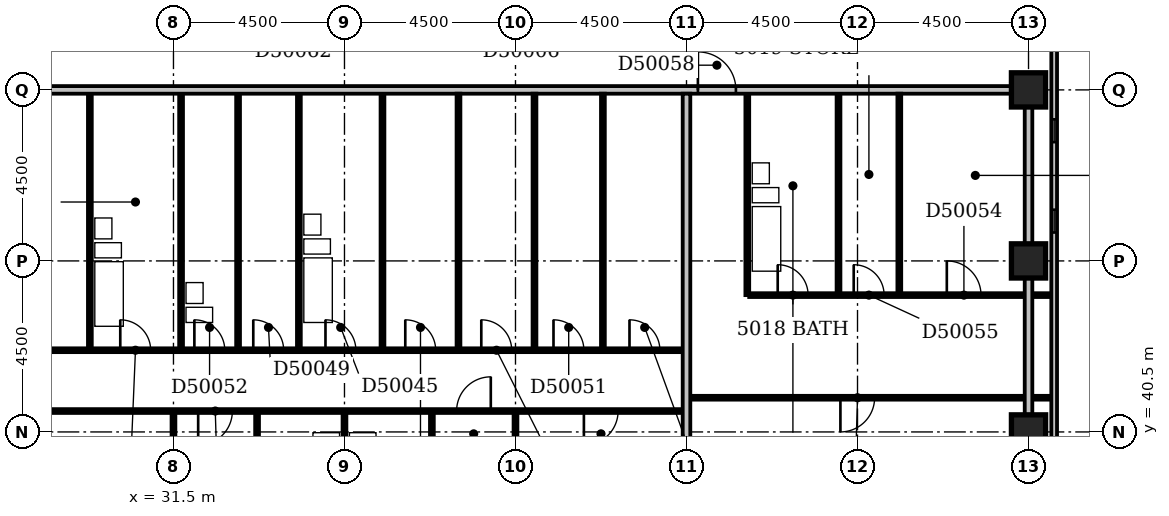
"""IFC4 building model, lengths in metres.
Left out: names, types, materials, properties, quantities, classifications, styles, units other than length and angle.
Written with IfcOpenShell. Run it as: python <this file> out.ifc"""

import sys

from ifc_helpers import new_model, si_unit, direction, frame, frame_2d, origin, origin_2d, place, context, subcontext, project, spatial, rectangle, extrude, element, fill, save


model = new_model("IFC4")
c1 = context("Model", 3, precision=1e-05, world=origin(), true_north=direction((0.0, 1.0)))
c2 = subcontext(c1, "Body", "Model", "MODEL_VIEW")
j1 = project(units=[si_unit("LENGTHUNIT", "METRE"), si_unit("PLANEANGLEUNIT", "RADIAN")], contexts=[c1])
p1 = place(None, origin())
s1 = spatial("IfcSite", under=j1, at=p1, CompositionType="ELEMENT")
p2 = place(p1, origin())
s2 = spatial("IfcBuilding", under=s1, at=p2, CompositionType="ELEMENT")
p3 = place(p2, frame((0.0, 0.0, 197.0)))
s3 = spatial("IfcBuildingStorey", under=s2, at=p3, CompositionType="ELEMENT", Elevation=197.0)
for number, where, z_axis, x_axis in (
    (1, (54.0, 40.5, -0.3), (0.0, 0.0, 1.0), (1.0, 0.0, 0.0)),
    (2, (54.0, 45.0, -0.3), (0.0, 0.0, 1.0), (1.0, 0.0, 0.0)),
    (3, (54.0, 49.5, -0.3), (0.0, 0.0, 1.0), (1.0, 0.0, 0.0)),
):
    element("IfcColumn", number, at=place(p3, frame(where, z_axis=z_axis, x_axis=x_axis)), inside=s3, PredefinedType="COLUMN", context=c2, shape_type="SweptSolid", body=[
        extrude(rectangle(XDim=0.9, YDim=0.9, at=origin_2d()), origin(), (0.0, 0.0, 1.0), 3.6),
    ])
p4 = place(p3, frame((54.675, 39.9, 0.0), z_axis=(0.0, 0.0, 1.0), x_axis=(0.0, 1.0, 0.0)))
e4 = element("IfcWall", 4, at=p4, inside=s3, PredefinedType="STANDARD", context=c2, shape_type="SweptSolid", body=[
    extrude(rectangle(XDim=14.85, YDim=0.15, at=frame_2d((7.425, 0.0))), origin(), (0.0, 0.0, 1.0), 2.7),
])
p5 = place(p4, frame((5.848, 0.0, 0.6)))
e5 = element("IfcOpeningElement", 5, at=p5, cuts=e4, PredefinedType="OPENING", context=c2, shape_type="SweptSolid", body=[
    extrude(rectangle(XDim=0.6, YDim=1.8, at=frame_2d((0.3, 0.9))), frame((0.0, 0.087, 0.0), z_axis=(0.0, -1.0, 0.0), x_axis=(1.0, 0.0, 0.0)), (0.0, 0.0, 1.0), 0.174),
])
p6 = place(p4, frame((8.226, 0.0, 0.6)))
e6 = element("IfcOpeningElement", 6, at=p6, cuts=e4, PredefinedType="OPENING", context=c2, shape_type="SweptSolid", body=[
    extrude(rectangle(XDim=0.6, YDim=1.8, at=frame_2d((0.3, 0.9))), frame((0.0, 0.087, 0.0), z_axis=(0.0, -1.0, 0.0), x_axis=(1.0, 0.0, 0.0)), (0.0, 0.0, 1.0), 0.174),
])
p7 = place(p3, frame((31.5, 36.45, 0.0), z_axis=(0.0, 0.0, 1.0), x_axis=(0.0, 1.0, 0.0)))
e7 = element("IfcWall", 7, at=p7, inside=s3, PredefinedType="PARTITIONING", context=c2, shape_type="SweptSolid", body=[
    extrude(rectangle(XDim=4.55, YDim=0.1, at=frame_2d((2.275, 0.0))), origin(), (0.0, 0.0, 1.0), 3.3),
])
p8 = place(p3, frame((36.0, 36.45, 0.0), z_axis=(0.0, 0.0, 1.0), x_axis=(0.0, 1.0, 0.0)))
e8 = element("IfcWall", 8, at=p8, inside=s3, PredefinedType="PARTITIONING", context=c2, shape_type="SweptSolid", body=[
    extrude(rectangle(XDim=4.55, YDim=0.1, at=frame_2d((2.275, 0.0))), origin(), (0.0, 0.0, 1.0), 2.4),
])
p9 = place(p3, frame((40.5, 36.45, 0.0), z_axis=(0.0, 0.0, 1.0), x_axis=(0.0, 1.0, 0.0)))
e9 = element("IfcWall", 9, at=p9, inside=s3, PredefinedType="PARTITIONING", context=c2, shape_type="SweptSolid", body=[
    extrude(rectangle(XDim=4.55, YDim=0.1, at=frame_2d((2.275, 0.0))), origin(), (0.0, 0.0, 1.0), 3.3),
])
p10 = place(p3, frame((45.0, 36.45, 0.0), z_axis=(0.0, 0.0, 1.0), x_axis=(0.0, 1.0, 0.0)))
e10 = element("IfcWall", 10, at=p10, inside=s3, PredefinedType="PARTITIONING", context=c2, shape_type="SweptSolid", body=[
    extrude(rectangle(XDim=12.95, YDim=0.2, at=frame_2d((6.475, 0.0))), origin(), (0.0, 0.0, 1.0), 2.6),
])
p11 = place(p3, frame((33.7, 38.15, 0.0), z_axis=(0.0, 0.0, 1.0), x_axis=(0.0, 1.0, 0.0)))
e11 = element("IfcWall", 11, at=p11, inside=s3, PredefinedType="PLUMBINGWALL", context=c2, shape_type="SweptSolid", body=[
    extrude(rectangle(XDim=2.85, YDim=0.1, at=frame_2d((1.425, 0.0))), origin(), (0.0, 0.0, 1.0), 3.3),
])
p12 = place(p11, frame((1.05, 0.0, 0.0)))
e12 = element("IfcOpeningElement", 12, at=p12, cuts=e11, PredefinedType="OPENING", context=c2, shape_type="SweptSolid", body=[
    extrude(rectangle(XDim=0.8, YDim=2.1, at=frame_2d((0.4, 1.05))), frame((0.0, 0.062, 0.0), z_axis=(0.0, -1.0, 0.0), x_axis=(1.0, 0.0, 0.0)), (0.0, 0.0, 1.0), 0.124),
])
p13 = place(p3, frame((38.3, 38.15, 0.0), z_axis=(0.0, 0.0, 1.0), x_axis=(0.0, 1.0, 0.0)))
e13 = element("IfcWall", 13, at=p13, inside=s3, PredefinedType="PLUMBINGWALL", context=c2, shape_type="SweptSolid", body=[
    extrude(rectangle(XDim=2.85, YDim=0.1, at=frame_2d((1.425, 0.0))), origin(), (0.0, 0.0, 1.0), 3.3),
])
p14 = place(p13, frame((1.05, 0.0, 0.0)))
e14 = element("IfcOpeningElement", 14, at=p14, cuts=e13, PredefinedType="OPENING", context=c2, shape_type="SweptSolid", body=[
    extrude(rectangle(XDim=0.8, YDim=2.1, at=frame_2d((0.4, 1.05))), frame((0.0, 0.062, 0.0), z_axis=(0.0, -1.0, 0.0), x_axis=(1.0, 0.0, 0.0)), (0.0, 0.0, 1.0), 0.124),
])
p15 = place(p3, frame((54.0, 40.95, 0.0), z_axis=(0.0, 0.0, 1.0), x_axis=(0.0, 1.0, 0.0)))
e15 = element("IfcWall", 15, at=p15, inside=s3, PredefinedType="PARTITIONING", context=c2, shape_type="SweptSolid", body=[
    extrude(rectangle(XDim=8.1, YDim=0.2, at=frame_2d((4.05, 0.0))), origin(), (0.0, 0.0, 1.0), 2.7),
])
p16 = place(p3, frame((22.6, 41.05, 0.0), z_axis=(0.0, 0.0, 1.0), x_axis=(1.0, 0.0, 0.0)))
e16 = element("IfcWall", 16, at=p16, inside=s3, PredefinedType="PARTITIONING", context=c2, shape_type="SweptSolid", body=[
    extrude(rectangle(XDim=22.3, YDim=0.1, at=frame_2d((11.15, 0.0))), origin(), (0.0, 0.0, 1.0), 3.3),
])
p17 = place(p16, frame((3.9, 0.0, 0.0)))
e17 = element("IfcOpeningElement", 17, at=p17, cuts=e16, PredefinedType="OPENING", context=c2, shape_type="SweptSolid", body=[
    extrude(rectangle(XDim=0.9, YDim=2.1, at=frame_2d((0.45, 1.05))), frame((0.0, 0.062, 0.0), z_axis=(0.0, -1.0, 0.0), x_axis=(1.0, 0.0, 0.0)), (0.0, 0.0, 1.0), 0.124),
])
p18 = place(p16, frame((9.55, 0.0, 0.0)))
e18 = element("IfcOpeningElement", 18, at=p18, cuts=e16, PredefinedType="OPENING", context=c2, shape_type="SweptSolid", body=[
    extrude(rectangle(XDim=0.9, YDim=2.1, at=frame_2d((0.45, 1.05))), frame((0.0, 0.062, 0.0), z_axis=(0.0, -1.0, 0.0), x_axis=(1.0, 0.0, 0.0)), (0.0, 0.0, 1.0), 0.124),
])
p19 = place(p16, frame((16.35, 0.0, 0.0)))
e19 = element("IfcOpeningElement", 19, at=p19, cuts=e16, PredefinedType="OPENING", context=c2, shape_type="SweptSolid", body=[
    extrude(rectangle(XDim=0.9, YDim=2.1, at=frame_2d((0.45, 1.05))), frame((0.0, 0.062, 0.0), z_axis=(0.0, -1.0, 0.0), x_axis=(1.0, 0.0, 0.0)), (0.0, 0.0, 1.0), 0.124),
])
p20 = place(p16, frame((19.7, 0.0, 0.0)))
e20 = element("IfcOpeningElement", 20, at=p20, cuts=e16, PredefinedType="OPENING", context=c2, shape_type="SweptSolid", body=[
    extrude(rectangle(XDim=0.9, YDim=2.1, at=frame_2d((0.45, 1.05))), frame((0.0, 0.062, 0.0), z_axis=(0.0, -1.0, 0.0), x_axis=(1.0, 0.0, 0.0)), (0.0, 0.0, 1.0), 0.124),
])
p21 = place(p3, frame((45.1, 41.4, 0.0), z_axis=(0.0, 0.0, 1.0), x_axis=(1.0, 0.0, 0.0)))
e21 = element("IfcWall", 21, at=p21, inside=s3, PredefinedType="PARTITIONING", context=c2, shape_type="SweptSolid", body=[
    extrude(rectangle(XDim=9.5, YDim=0.1, at=frame_2d((4.75, 0.0))), origin(), (0.0, 0.0, 1.0), 3.3),
])
p22 = place(p21, frame((3.95, 0.0, 0.0)))
e22 = element("IfcOpeningElement", 22, at=p22, cuts=e21, PredefinedType="OPENING", context=c2, shape_type="SweptSolid", body=[
    extrude(rectangle(XDim=0.9, YDim=2.1, at=frame_2d((0.45, 1.05))), frame((0.0, 0.062, 0.0), z_axis=(0.0, -1.0, 0.0), x_axis=(1.0, 0.0, 0.0)), (0.0, 0.0, 1.0), 0.124),
])
p23 = place(p3, frame((24.15, 42.65, 0.0), z_axis=(0.0, 0.0, 1.0), x_axis=(1.0, 0.0, 0.0)))
e23 = element("IfcWall", 23, at=p23, inside=s3, PredefinedType="PARTITIONING", context=c2, shape_type="SweptSolid", body=[
    extrude(rectangle(XDim=20.75, YDim=0.1, at=frame_2d((10.375, 0.0))), origin(), (0.0, 0.0, 1.0), 3.3),
])
p24 = place(p23, frame((5.95, 0.0, 0.0)))
e24 = element("IfcOpeningElement", 24, at=p24, cuts=e23, PredefinedType="OPENING", context=c2, shape_type="SweptSolid", body=[
    extrude(rectangle(XDim=0.8, YDim=2.1, at=frame_2d((0.4, 1.05))), frame((0.0, 0.062, 0.0), z_axis=(0.0, -1.0, 0.0), x_axis=(1.0, 0.0, 0.0)), (0.0, 0.0, 1.0), 0.124),
])
p25 = place(p23, frame((11.35, 0.0, 0.0)))
e25 = element("IfcOpeningElement", 25, at=p25, cuts=e23, PredefinedType="OPENING", context=c2, shape_type="SweptSolid", body=[
    extrude(rectangle(XDim=0.8, YDim=2.1, at=frame_2d((0.4, 1.05))), frame((0.0, 0.062, 0.0), z_axis=(0.0, -1.0, 0.0), x_axis=(1.0, 0.0, 0.0)), (0.0, 0.0, 1.0), 0.124),
])
p26 = place(p23, frame((2.1, 0.0, 0.0)))
e26 = element("IfcOpeningElement", 26, at=p26, cuts=e23, PredefinedType="OPENING", context=c2, shape_type="SweptSolid", body=[
    extrude(rectangle(XDim=0.9, YDim=2.1, at=frame_2d((0.45, 1.05))), frame((0.0, 0.062, 0.0), z_axis=(0.0, -1.0, 0.0), x_axis=(1.0, 0.0, 0.0)), (0.0, 0.0, 1.0), 0.124),
])
p27 = place(p23, frame((19.35, 0.0, 0.0)))
e27 = element("IfcOpeningElement", 27, at=p27, cuts=e23, PredefinedType="OPENING", context=c2, shape_type="SweptSolid", body=[
    extrude(rectangle(XDim=0.8, YDim=2.1, at=frame_2d((0.4, 1.05))), frame((0.0, 0.062, 0.0), z_axis=(0.0, -1.0, 0.0), x_axis=(1.0, 0.0, 0.0)), (0.0, 0.0, 1.0), 0.124),
])
p28 = place(p23, frame((15.45, 0.0, 0.0)))
e28 = element("IfcOpeningElement", 28, at=p28, cuts=e23, PredefinedType="OPENING", context=c2, shape_type="SweptSolid", body=[
    extrude(rectangle(XDim=0.8, YDim=2.1, at=frame_2d((0.4, 1.05))), frame((0.0, 0.062, 0.0), z_axis=(0.0, -1.0, 0.0), x_axis=(1.0, 0.0, 0.0)), (0.0, 0.0, 1.0), 0.124),
])
p29 = place(p23, frame((9.45, 0.0, 0.0)))
e29 = element("IfcOpeningElement", 29, at=p29, cuts=e23, PredefinedType="OPENING", context=c2, shape_type="SweptSolid", body=[
    extrude(rectangle(XDim=0.8, YDim=2.1, at=frame_2d((0.4, 1.05))), frame((0.0, 0.062, 0.0), z_axis=(0.0, -1.0, 0.0), x_axis=(1.0, 0.0, 0.0)), (0.0, 0.0, 1.0), 0.124),
])
p30 = place(p23, frame((13.45, 0.0, 0.0)))
e30 = element("IfcOpeningElement", 30, at=p30, cuts=e23, PredefinedType="OPENING", context=c2, shape_type="SweptSolid", body=[
    extrude(rectangle(XDim=0.8, YDim=2.1, at=frame_2d((0.4, 1.05))), frame((0.0, 0.062, 0.0), z_axis=(0.0, -1.0, 0.0), x_axis=(1.0, 0.0, 0.0)), (0.0, 0.0, 1.0), 0.124),
])
p31 = place(p23, frame((17.35, 0.0, 0.0)))
e31 = element("IfcOpeningElement", 31, at=p31, cuts=e23, PredefinedType="OPENING", context=c2, shape_type="SweptSolid", body=[
    extrude(rectangle(XDim=0.8, YDim=2.1, at=frame_2d((0.4, 1.05))), frame((0.0, 0.062, 0.0), z_axis=(0.0, -1.0, 0.0), x_axis=(1.0, 0.0, 0.0)), (0.0, 0.0, 1.0), 0.124),
])
p32 = place(p23, frame((7.9, 0.0, 0.0)))
e32 = element("IfcOpeningElement", 32, at=p32, cuts=e23, PredefinedType="OPENING", context=c2, shape_type="SweptSolid", body=[
    extrude(rectangle(XDim=0.8, YDim=2.1, at=frame_2d((0.4, 1.05))), frame((0.0, 0.062, 0.0), z_axis=(0.0, -1.0, 0.0), x_axis=(1.0, 0.0, 0.0)), (0.0, 0.0, 1.0), 0.124),
])
for number, where, z_axis, x_axis in (
    (33, (29.3, 42.7, 0.0), (0.0, 0.0, 1.0), (0.0, 1.0, 0.0)),
    (34, (31.7, 42.7, 0.0), (0.0, 0.0, 1.0), (0.0, 1.0, 0.0)),
    (35, (33.2, 42.7, 0.0), (0.0, 0.0, 1.0), (0.0, 1.0, 0.0)),
    (36, (34.8, 42.7, 0.0), (0.0, 0.0, 1.0), (0.0, 1.0, 0.0)),
    (37, (37.0, 42.7, 0.0), (0.0, 0.0, 1.0), (0.0, 1.0, 0.0)),
):
    element("IfcWall", number, at=place(p3, frame(where, z_axis=z_axis, x_axis=x_axis)), inside=s3, PredefinedType="PLUMBINGWALL", context=c2, shape_type="SweptSolid", body=[
        extrude(rectangle(XDim=6.7, YDim=0.1, at=frame_2d((3.35, 0.0))), origin(), (0.0, 0.0, 1.0), 3.3),
    ])
for number, where, z_axis, x_axis in (
    (38, (39.0, 42.7, 0.0), (0.0, 0.0, 1.0), (0.0, 1.0, 0.0)),
    (39, (41.0, 42.7, 0.0), (0.0, 0.0, 1.0), (0.0, 1.0, 0.0)),
    (40, (42.8, 42.7, 0.0), (0.0, 0.0, 1.0), (0.0, 1.0, 0.0)),
):
    element("IfcWall", number, at=place(p3, frame(where, z_axis=z_axis, x_axis=x_axis)), inside=s3, PredefinedType="PARTITIONING", context=c2, shape_type="SweptSolid", body=[
        extrude(rectangle(XDim=6.7, YDim=0.1, at=frame_2d((3.35, 0.0))), origin(), (0.0, 0.0, 1.0), 3.3),
    ])
p33 = place(p3, frame((46.6, 44.1, 0.0), z_axis=(0.0, 0.0, 1.0), x_axis=(0.0, 1.0, 0.0)))
e41 = element("IfcWall", 41, at=p33, inside=s3, PredefinedType="PLUMBINGWALL", context=c2, shape_type="SweptSolid", body=[
    extrude(rectangle(XDim=5.3, YDim=0.1, at=frame_2d((2.65, 0.0))), origin(), (0.0, 0.0, 1.0), 3.3),
])
p34 = place(p3, frame((46.65, 44.1, 0.0), z_axis=(0.0, 0.0, 1.0), x_axis=(1.0, 0.0, 0.0)))
e42 = element("IfcWall", 42, at=p34, inside=s3, PredefinedType="PARTITIONING", context=c2, shape_type="SweptSolid", body=[
    extrude(rectangle(XDim=7.95, YDim=0.1, at=frame_2d((3.975, 0.0))), origin(), (0.0, 0.0, 1.0), 3.3),
])
p35 = place(p34, frame((0.75, 0.0, 0.0)))
e43 = element("IfcOpeningElement", 43, at=p35, cuts=e42, PredefinedType="OPENING", context=c2, shape_type="SweptSolid", body=[
    extrude(rectangle(XDim=0.8, YDim=2.1, at=frame_2d((0.4, 1.05))), frame((0.0, 0.062, 0.0), z_axis=(0.0, -1.0, 0.0), x_axis=(1.0, 0.0, 0.0)), (0.0, 0.0, 1.0), 0.124),
])
p36 = place(p34, frame((5.2, 0.0, 0.0)))
e44 = element("IfcOpeningElement", 44, at=p36, cuts=e42, PredefinedType="OPENING", context=c2, shape_type="SweptSolid", body=[
    extrude(rectangle(XDim=0.9, YDim=2.1, at=frame_2d((0.45, 1.05))), frame((0.0, 0.062, 0.0), z_axis=(0.0, -1.0, 0.0), x_axis=(1.0, 0.0, 0.0)), (0.0, 0.0, 1.0), 0.124),
])
p37 = place(p34, frame((2.75, 0.0, 0.0)))
e45 = element("IfcOpeningElement", 45, at=p37, cuts=e42, PredefinedType="OPENING", context=c2, shape_type="SweptSolid", body=[
    extrude(rectangle(XDim=0.8, YDim=2.1, at=frame_2d((0.4, 1.05))), frame((0.0, 0.062, 0.0), z_axis=(0.0, -1.0, 0.0), x_axis=(1.0, 0.0, 0.0)), (0.0, 0.0, 1.0), 0.124),
])
p38 = place(p3, frame((49.0, 44.15, 0.0), z_axis=(0.0, 0.0, 1.0), x_axis=(0.0, 1.0, 0.0)))
e46 = element("IfcWall", 46, at=p38, inside=s3, PredefinedType="PLUMBINGWALL", context=c2, shape_type="SweptSolid", body=[
    extrude(rectangle(XDim=5.25, YDim=0.1, at=frame_2d((2.625, 0.0))), origin(), (0.0, 0.0, 1.0), 3.3),
])
p39 = place(p3, frame((50.6, 44.15, 0.0), z_axis=(0.0, 0.0, 1.0), x_axis=(0.0, 1.0, 0.0)))
e47 = element("IfcWall", 47, at=p39, inside=s3, PredefinedType="PARTITIONING", context=c2, shape_type="SweptSolid", body=[
    extrude(rectangle(XDim=5.25, YDim=0.1, at=frame_2d((2.625, 0.0))), origin(), (0.0, 0.0, 1.0), 3.3),
])
p40 = place(p3, frame((22.6, 49.5, 0.0), z_axis=(0.0, 0.0, 1.0), x_axis=(1.0, 0.0, 0.0)))
e48 = element("IfcWall", 48, at=p40, inside=s3, PredefinedType="PARTITIONING", context=c2, shape_type="SweptSolid", body=[
    extrude(rectangle(XDim=30.95, YDim=0.2, at=frame_2d((15.475, 0.0))), origin(), (0.0, 0.0, 1.0), 3.3),
])
p41 = place(p40, frame((0.2, 0.0, 0.0)))
e49 = element("IfcOpeningElement", 49, at=p41, cuts=e48, PredefinedType="OPENING", context=c2, shape_type="SweptSolid", body=[
    extrude(rectangle(XDim=1.0, YDim=2.1, at=frame_2d((0.5, 1.05))), frame((0.0, 0.112, 0.0), z_axis=(0.0, -1.0, 0.0), x_axis=(1.0, 0.0, 0.0)), (0.0, 0.0, 1.0), 0.224),
])
p42 = place(p40, frame((22.7, 0.0, 0.0)))
e50 = element("IfcOpeningElement", 50, at=p42, cuts=e48, PredefinedType="OPENING", context=c2, shape_type="SweptSolid", body=[
    extrude(rectangle(XDim=1.0, YDim=2.1, at=frame_2d((0.5, 1.05))), frame((0.0, 0.112, 0.0), z_axis=(0.0, -1.0, 0.0), x_axis=(1.0, 0.0, 0.0)), (0.0, 0.0, 1.0), 0.224),
])
p43 = place(p5, origin())
e51 = element("IfcWindow", 51, at=p43, inside=s3, PartitioningType="SINGLE_PANEL", PredefinedType="WINDOW", context=c2, shape_type="SweptSolid", body=[
    extrude(rectangle(XDim=0.6, YDim=1.8, at=frame_2d((0.3, 0.9))), frame((0.0, 0.03, 0.0), z_axis=(0.0, -1.0, 0.0), x_axis=(1.0, 0.0, 0.0)), (0.0, 0.0, 1.0), 0.06),
])
fill(e5, e51)
p44 = place(p6, origin())
e52 = element("IfcWindow", 52, at=p44, inside=s3, PartitioningType="SINGLE_PANEL", PredefinedType="WINDOW", context=c2, shape_type="SweptSolid", body=[
    extrude(rectangle(XDim=0.6, YDim=1.8, at=frame_2d((0.3, 0.9))), frame((0.0, 0.03, 0.0), z_axis=(0.0, -1.0, 0.0), x_axis=(1.0, 0.0, 0.0)), (0.0, 0.0, 1.0), 0.06),
])
fill(e6, e52)
p45 = place(p18, frame((0.9, 0.0, 0.0), z_axis=(0.0, 0.0, 1.0), x_axis=(-1.0, 0.0, 0.0)))
e53 = element("IfcDoor", 53, at=p45, inside=s3, OperationType="SINGLE_SWING_RIGHT", PredefinedType="DOOR", context=c2, shape_type="SweptSolid", body=[
    extrude(rectangle(XDim=0.9, YDim=2.1, at=frame_2d((0.45, 1.05))), frame((0.0, 0.025, 0.0), z_axis=(0.0, -1.0, 0.0), x_axis=(1.0, 0.0, 0.0)), (0.0, 0.0, 1.0), 0.05),
])
fill(e18, e53)
p46 = place(p19, frame((0.9, 0.0, 0.0), z_axis=(0.0, 0.0, 1.0), x_axis=(-1.0, 0.0, 0.0)))
e54 = element("IfcDoor", 54, at=p46, inside=s3, OperationType="SINGLE_SWING_LEFT", PredefinedType="DOOR", context=c2, shape_type="SweptSolid", body=[
    extrude(rectangle(XDim=0.9, YDim=2.1, at=frame_2d((0.45, 1.05))), frame((0.0, 0.025, 0.0), z_axis=(0.0, -1.0, 0.0), x_axis=(1.0, 0.0, 0.0)), (0.0, 0.0, 1.0), 0.05),
])
fill(e19, e54)
p47 = place(p20, frame((0.9, 0.0, 0.0), z_axis=(0.0, 0.0, 1.0), x_axis=(-1.0, 0.0, 0.0)))
e55 = element("IfcDoor", 55, at=p47, inside=s3, OperationType="SINGLE_SWING_RIGHT", PredefinedType="DOOR", context=c2, shape_type="SweptSolid", body=[
    extrude(rectangle(XDim=0.9, YDim=2.1, at=frame_2d((0.45, 1.05))), frame((0.0, 0.025, 0.0), z_axis=(0.0, -1.0, 0.0), x_axis=(1.0, 0.0, 0.0)), (0.0, 0.0, 1.0), 0.05),
])
fill(e20, e55)
p48 = place(p22, frame((0.9, 0.0, 0.0), z_axis=(0.0, 0.0, 1.0), x_axis=(-1.0, 0.0, 0.0)))
e56 = element("IfcDoor", 56, at=p48, inside=s3, OperationType="SINGLE_SWING_RIGHT", PredefinedType="DOOR", context=c2, shape_type="SweptSolid", body=[
    extrude(rectangle(XDim=0.9, YDim=2.1, at=frame_2d((0.45, 1.05))), frame((0.0, 0.025, 0.0), z_axis=(0.0, -1.0, 0.0), x_axis=(1.0, 0.0, 0.0)), (0.0, 0.0, 1.0), 0.05),
])
fill(e22, e56)
p49 = place(p24, origin())
e57 = element("IfcDoor", 57, at=p49, inside=s3, OperationType="SINGLE_SWING_LEFT", PredefinedType="DOOR", context=c2, shape_type="SweptSolid", body=[
    extrude(rectangle(XDim=0.8, YDim=2.1, at=frame_2d((0.4, 1.05))), frame((0.0, 0.025, 0.0), z_axis=(0.0, -1.0, 0.0), x_axis=(1.0, 0.0, 0.0)), (0.0, 0.0, 1.0), 0.05),
])
fill(e24, e57)
p50 = place(p25, origin())
e58 = element("IfcDoor", 58, at=p50, inside=s3, OperationType="SINGLE_SWING_LEFT", PredefinedType="DOOR", context=c2, shape_type="SweptSolid", body=[
    extrude(rectangle(XDim=0.8, YDim=2.1, at=frame_2d((0.4, 1.05))), frame((0.0, 0.025, 0.0), z_axis=(0.0, -1.0, 0.0), x_axis=(1.0, 0.0, 0.0)), (0.0, 0.0, 1.0), 0.05),
])
fill(e25, e58)
p51 = place(p27, origin())
e59 = element("IfcDoor", 59, at=p51, inside=s3, OperationType="SINGLE_SWING_LEFT", PredefinedType="DOOR", context=c2, shape_type="SweptSolid", body=[
    extrude(rectangle(XDim=0.8, YDim=2.1, at=frame_2d((0.4, 1.05))), frame((0.0, 0.025, 0.0), z_axis=(0.0, -1.0, 0.0), x_axis=(1.0, 0.0, 0.0)), (0.0, 0.0, 1.0), 0.05),
])
fill(e27, e59)
p52 = place(p28, origin())
e60 = element("IfcDoor", 60, at=p52, inside=s3, OperationType="SINGLE_SWING_LEFT", PredefinedType="DOOR", context=c2, shape_type="SweptSolid", body=[
    extrude(rectangle(XDim=0.8, YDim=2.1, at=frame_2d((0.4, 1.05))), frame((0.0, 0.025, 0.0), z_axis=(0.0, -1.0, 0.0), x_axis=(1.0, 0.0, 0.0)), (0.0, 0.0, 1.0), 0.05),
])
fill(e28, e60)
p53 = place(p29, origin())
e61 = element("IfcDoor", 61, at=p53, inside=s3, OperationType="SINGLE_SWING_LEFT", PredefinedType="DOOR", context=c2, shape_type="SweptSolid", body=[
    extrude(rectangle(XDim=0.8, YDim=2.1, at=frame_2d((0.4, 1.05))), frame((0.0, 0.025, 0.0), z_axis=(0.0, -1.0, 0.0), x_axis=(1.0, 0.0, 0.0)), (0.0, 0.0, 1.0), 0.05),
])
fill(e29, e61)
p54 = place(p30, origin())
e62 = element("IfcDoor", 62, at=p54, inside=s3, OperationType="SINGLE_SWING_LEFT", PredefinedType="DOOR", context=c2, shape_type="SweptSolid", body=[
    extrude(rectangle(XDim=0.8, YDim=2.1, at=frame_2d((0.4, 1.05))), frame((0.0, 0.025, 0.0), z_axis=(0.0, -1.0, 0.0), x_axis=(1.0, 0.0, 0.0)), (0.0, 0.0, 1.0), 0.05),
])
fill(e30, e62)
p55 = place(p31, origin())
e63 = element("IfcDoor", 63, at=p55, inside=s3, OperationType="SINGLE_SWING_LEFT", PredefinedType="DOOR", context=c2, shape_type="SweptSolid", body=[
    extrude(rectangle(XDim=0.8, YDim=2.1, at=frame_2d((0.4, 1.05))), frame((0.0, 0.025, 0.0), z_axis=(0.0, -1.0, 0.0), x_axis=(1.0, 0.0, 0.0)), (0.0, 0.0, 1.0), 0.05),
])
fill(e31, e63)
p56 = place(p32, origin())
e64 = element("IfcDoor", 64, at=p56, inside=s3, OperationType="SINGLE_SWING_LEFT", PredefinedType="DOOR", context=c2, shape_type="SweptSolid", body=[
    extrude(rectangle(XDim=0.8, YDim=2.1, at=frame_2d((0.4, 1.05))), frame((0.0, 0.025, 0.0), z_axis=(0.0, -1.0, 0.0), x_axis=(1.0, 0.0, 0.0)), (0.0, 0.0, 1.0), 0.05),
])
fill(e32, e64)
p57 = place(p35, origin())
e65 = element("IfcDoor", 65, at=p57, inside=s3, OperationType="SINGLE_SWING_LEFT", PredefinedType="DOOR", context=c2, shape_type="SweptSolid", body=[
    extrude(rectangle(XDim=0.8, YDim=2.1, at=frame_2d((0.4, 1.05))), frame((0.0, 0.025, 0.0), z_axis=(0.0, -1.0, 0.0), x_axis=(1.0, 0.0, 0.0)), (0.0, 0.0, 1.0), 0.05),
])
fill(e43, e65)
p58 = place(p36, origin())
e66 = element("IfcDoor", 66, at=p58, inside=s3, OperationType="SINGLE_SWING_LEFT", PredefinedType="DOOR", context=c2, shape_type="SweptSolid", body=[
    extrude(rectangle(XDim=0.9, YDim=2.1, at=frame_2d((0.45, 1.05))), frame((0.0, 0.025, 0.0), z_axis=(0.0, -1.0, 0.0), x_axis=(1.0, 0.0, 0.0)), (0.0, 0.0, 1.0), 0.05),
])
fill(e44, e66)
p59 = place(p37, origin())
e67 = element("IfcDoor", 67, at=p59, inside=s3, OperationType="SINGLE_SWING_LEFT", PredefinedType="DOOR", context=c2, shape_type="SweptSolid", body=[
    extrude(rectangle(XDim=0.8, YDim=2.1, at=frame_2d((0.4, 1.05))), frame((0.0, 0.025, 0.0), z_axis=(0.0, -1.0, 0.0), x_axis=(1.0, 0.0, 0.0)), (0.0, 0.0, 1.0), 0.05),
])
fill(e45, e67)
p60 = place(p42, origin())
e68 = element("IfcDoor", 68, at=p60, inside=s3, OperationType="SINGLE_SWING_LEFT", PredefinedType="DOOR", context=c2, shape_type="SweptSolid", body=[
    extrude(rectangle(XDim=1.0, YDim=2.1, at=frame_2d((0.5, 1.05))), frame((0.0, 0.025, 0.0), z_axis=(0.0, -1.0, 0.0), x_axis=(1.0, 0.0, 0.0)), (0.0, 0.0, 1.0), 0.05),
])
fill(e50, e68)
save(model, sys.argv[1])
